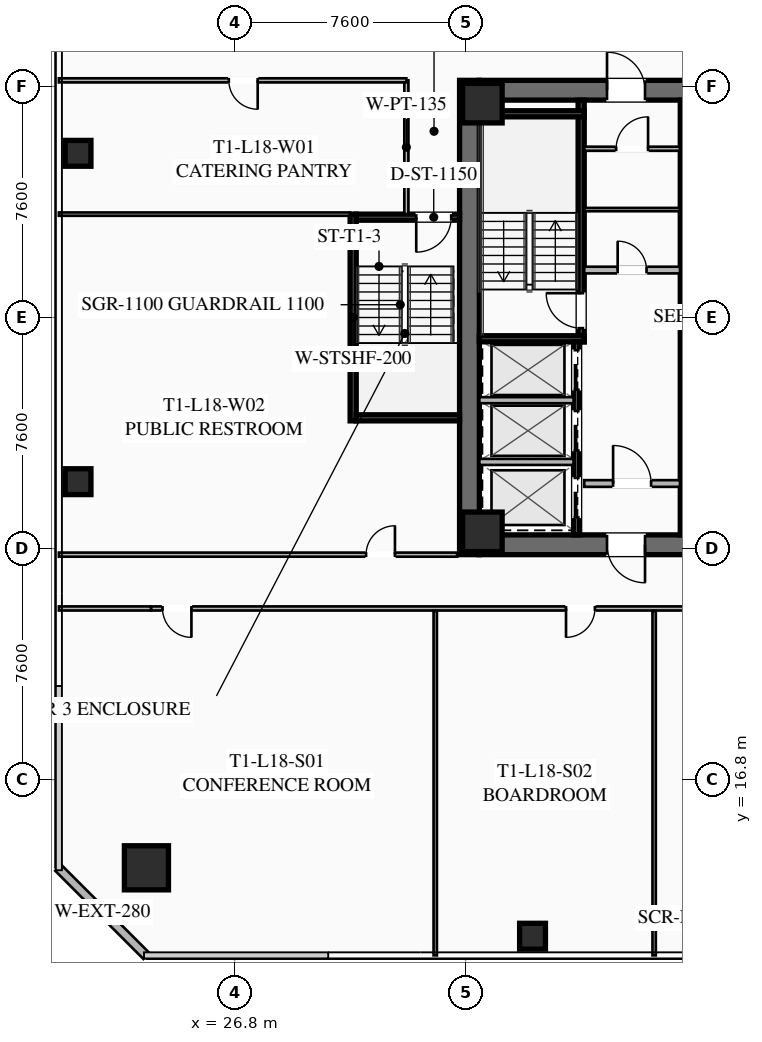
"""IFC4 building model, lengths in metres.
Left out: names, types, materials, properties, quantities, classifications, styles, units other than length and angle.
Written with IfcOpenShell. Run it as: python <this file> out.ifc"""

import sys

from ifc_helpers import new_model, si_unit, direction, frame, frame_2d, origin, origin_2d, place, context, subcontext, project, spatial, rectangle, hollow_rectangle, extrude, element, fill, save


model = new_model("IFC4")
c1 = context("Model", 3, precision=1e-05, world=origin(), true_north=direction((0.0, 1.0)))
c2 = subcontext(c1, "Body", "Model", "MODEL_VIEW")
j1 = project(units=[si_unit("LENGTHUNIT", "METRE"), si_unit("PLANEANGLEUNIT", "RADIAN")], contexts=[c1])
p1 = place(None, origin())
s1 = spatial("IfcSite", under=j1, at=p1, CompositionType="ELEMENT")
p2 = place(p1, origin())
s2 = spatial("IfcBuilding", under=s1, at=p2, CompositionType="ELEMENT")
p3 = place(p2, frame((0.0, 0.0, 70.75)))
s3 = spatial("IfcBuildingStorey", under=s2, at=p3, CompositionType="ELEMENT", Elevation=70.75)
p4 = place(p3, frame((34.525, 24.2, 0.0), z_axis=(0.0, 0.0, 1.0), x_axis=(0.0, 1.0, 0.0)))
e1 = element("IfcWall", 1, at=p4, inside=s3, PredefinedType="SHEAR", context=c2, shape_type="SweptSolid", body=[
    extrude(rectangle(XDim=15.6, YDim=0.65, at=frame_2d((7.8, 0.0))), origin(), (0.0, 0.0, 1.0), 3.55),
])
p5 = place(p3, frame((49.15, 24.525, 0.0), z_axis=(0.0, 0.0, 1.0), x_axis=(-1.0, 0.0, 0.0)))
e2 = element("IfcWall", 2, at=p5, inside=s3, PredefinedType="SHEAR", context=c2, shape_type="SweptSolid", body=[
    extrude(rectangle(XDim=14.3, YDim=0.65, at=frame_2d((7.15, 0.0))), origin(), (0.0, 0.0, 1.0), 3.55),
])
p6 = place(p5, frame((8.85, 0.0, 0.0)))
e3 = element("IfcOpeningElement", 3, at=p6, cuts=e2, PredefinedType="OPENING", context=c2, shape_type="SweptSolid", body=[
    extrude(rectangle(XDim=1.25, YDim=2.25, at=frame_2d((0.625, 1.125))), frame((0.0, 0.335, 0.0), z_axis=(0.0, -1.0, 0.0), x_axis=(1.0, 0.0, 0.0)), (0.0, 0.0, 1.0), 0.67),
])
p7 = place(p5, frame((3.8, 0.0, 0.0)))
e4 = element("IfcOpeningElement", 4, at=p7, cuts=e2, PredefinedType="OPENING", context=c2, shape_type="SweptSolid", body=[
    extrude(rectangle(XDim=1.25, YDim=2.25, at=frame_2d((0.625, 1.125))), frame((0.0, 0.335, 0.0), z_axis=(0.0, -1.0, 0.0), x_axis=(1.0, 0.0, 0.0)), (0.0, 0.0, 1.0), 0.67),
])
p8 = place(p3, frame((34.85, 39.475, 0.0), z_axis=(0.0, 0.0, 1.0), x_axis=(1.0, 0.0, 0.0)))
e5 = element("IfcWall", 5, at=p8, inside=s3, PredefinedType="SHEAR", context=c2, shape_type="SweptSolid", body=[
    extrude(rectangle(XDim=14.3, YDim=0.65, at=frame_2d((7.15, 0.0))), origin(), (0.0, 0.0, 1.0), 3.55),
])
p9 = place(p8, frame((4.2, 0.0, 0.0)))
e6 = element("IfcOpeningElement", 6, at=p9, cuts=e5, PredefinedType="OPENING", context=c2, shape_type="SweptSolid", body=[
    extrude(rectangle(XDim=1.25, YDim=2.25, at=frame_2d((0.625, 1.125))), frame((0.0, 0.335, 0.0), z_axis=(0.0, -1.0, 0.0), x_axis=(1.0, 0.0, 0.0)), (0.0, 0.0, 1.0), 0.67),
])
p10 = place(p8, frame((9.25, 0.0, 0.0)))
e7 = element("IfcOpeningElement", 7, at=p10, cuts=e5, PredefinedType="OPENING", context=c2, shape_type="SweptSolid", body=[
    extrude(rectangle(XDim=1.25, YDim=2.25, at=frame_2d((0.625, 1.125))), frame((0.0, 0.335, 0.0), z_axis=(0.0, -1.0, 0.0), x_axis=(1.0, 0.0, 0.0)), (0.0, 0.0, 1.0), 0.67),
])
for number, where, z_axis, x_axis in (
    (8, (34.95, 24.95, 0.0), (0.0, 0.0, 1.0), (1.0, 0.0, 0.0)),
    (9, (34.95, 39.05, 0.0), (0.0, 0.0, 1.0), (1.0, 0.0, 0.0)),
):
    element("IfcColumn", number, at=place(p3, frame(where, z_axis=z_axis, x_axis=x_axis)), inside=s3, PredefinedType="COLUMN", context=c2, shape_type="SweptSolid", body=[
        extrude(hollow_rectangle(XDim=1.3, YDim=1.3, WallThickness=0.05, at=origin_2d()), origin(), (0.0, 0.0, 1.0), 3.35),
    ])
p11 = place(p3, frame((23.9, 13.9, 0.0), z_axis=(0.0, 0.0, 1.0), x_axis=(1.0, 0.0, 0.0)))
e10 = element("IfcColumn", 10, at=p11, inside=s3, PredefinedType="COLUMN", context=c2, shape_type="SweptSolid", body=[
    extrude(hollow_rectangle(XDim=1.45, YDim=1.45, WallThickness=0.055, at=origin_2d()), origin(), (0.0, 0.0, 1.0), 3.35),
])
for number, where, z_axis, x_axis in (
    (11, (36.6, 11.65, 0.0), (0.0, 0.0, 1.0), (1.0, 0.0, 0.0)),
    (12, (21.65, 37.4, 0.0), (0.0, 0.0, 1.0), (1.0, 0.0, 0.0)),
    (13, (21.65, 26.6, 0.0), (0.0, 0.0, 1.0), (1.0, 0.0, 0.0)),
):
    element("IfcColumn", number, at=place(p3, frame(where, z_axis=z_axis, x_axis=x_axis)), inside=s3, PredefinedType="COLUMN", context=c2, shape_type="SweptSolid", body=[
        extrude(hollow_rectangle(XDim=0.85, YDim=0.85, WallThickness=0.035, at=origin_2d()), origin(), (0.0, 0.0, 1.0), 3.35),
    ])
p12 = place(p3, frame((23.9, 11.0, 0.0), z_axis=(0.0, 0.0, 1.0), x_axis=(-0.707106781187, 0.707106781187, 0.0)))
e14 = element("IfcWall", 14, at=p12, inside=s3, PredefinedType="SOLIDWALL", context=c2, shape_type="SweptSolid", body=[
    extrude(rectangle(XDim=4.101, YDim=0.28, at=frame_2d((2.051, 0.0))), origin(), (0.0, 0.0, 1.0), 3.35),
])
p13 = place(p3, frame((38.2, 31.2, 0.0), z_axis=(0.0, 0.0, 1.0), x_axis=(0.0, 1.0, 0.0)))
e15 = element("IfcWall", 15, at=p13, inside=s3, PredefinedType="SHEAR", context=c2, shape_type="SweptSolid", body=[
    extrude(rectangle(XDim=7.95, YDim=0.2, at=frame_2d((3.975, 0.0))), origin(), (0.0, 0.0, 1.0), 3.35),
])
p14 = place(p13, frame((0.45, 0.0, 0.0)))
e16 = element("IfcOpeningElement", 16, at=p14, cuts=e15, PredefinedType="OPENING", context=c2, shape_type="SweptSolid", body=[
    extrude(rectangle(XDim=1.15, YDim=2.2, at=frame_2d((0.575, 1.1))), frame((0.0, 0.11, 0.0), z_axis=(0.0, -1.0, 0.0), x_axis=(1.0, 0.0, 0.0)), (0.0, 0.0, 1.0), 0.22),
])
for number, where, z_axis, x_axis in (
    (17, (34.85, 31.3, 0.0), (0.0, 0.0, 1.0), (1.0, 0.0, 0.0)),
    (18, (34.85, 38.7, 0.0), (0.0, 0.0, 1.0), (1.0, 0.0, 0.0)),
):
    element("IfcWall", number, at=place(p3, frame(where, z_axis=z_axis, x_axis=x_axis)), inside=s3, PredefinedType="SHEAR", context=c2, shape_type="SweptSolid", body=[
        extrude(rectangle(XDim=3.45, YDim=0.2, at=frame_2d((1.725, 0.0))), origin(), (0.0, 0.0, 1.0), 3.35),
    ])
p15 = place(p3, frame((41.56, 24.85, 0.0), z_axis=(0.0, 0.0, 1.0), x_axis=(0.0, 1.0, 0.0)))
e19 = element("IfcWall", 19, at=p15, inside=s3, PredefinedType="SHEAR", context=c2, shape_type="SweptSolid", body=[
    extrude(rectangle(XDim=14.3, YDim=0.2, at=frame_2d((7.15, 0.0))), origin(), (0.0, 0.0, 1.0), 3.35),
])
p16 = place(p3, frame((38.3, 33.56, 0.0), z_axis=(0.0, 0.0, 1.0), x_axis=(1.0, 0.0, 0.0)))
e20 = element("IfcWall", 20, at=p16, inside=s3, PredefinedType="SOLIDWALL", context=c2, shape_type="SweptSolid", body=[
    extrude(rectangle(XDim=3.15, YDim=0.22, at=frame_2d((1.575, 0.0))), origin(), (0.0, 0.0, 1.0), 2.703),
])
p17 = place(p16, frame((1.1, 0.0, 0.0)))
e21 = element("IfcOpeningElement", 21, at=p17, cuts=e20, PredefinedType="OPENING", context=c2, shape_type="SweptSolid", body=[
    extrude(rectangle(XDim=0.95, YDim=2.05, at=frame_2d((0.475, 1.025))), frame((0.0, 0.12, 0.0), z_axis=(0.0, -1.0, 0.0), x_axis=(1.0, 0.0, 0.0)), (0.0, 0.0, 1.0), 0.24),
])
p18 = place(p3, frame((38.3, 26.54, 0.0), z_axis=(0.0, 0.0, 1.0), x_axis=(1.0, 0.0, 0.0)))
e22 = element("IfcWall", 22, at=p18, inside=s3, PredefinedType="SOLIDWALL", context=c2, shape_type="SweptSolid", body=[
    extrude(rectangle(XDim=3.15, YDim=0.22, at=frame_2d((1.575, 0.0))), origin(), (0.0, 0.0, 1.0), 2.703),
])
p19 = place(p18, frame((0.95, 0.0, 0.0)))
e23 = element("IfcOpeningElement", 23, at=p19, cuts=e22, PredefinedType="OPENING", context=c2, shape_type="SweptSolid", body=[
    extrude(rectangle(XDim=1.25, YDim=2.25, at=frame_2d((0.625, 1.125))), frame((0.0, 0.12, 0.0), z_axis=(0.0, -1.0, 0.0), x_axis=(1.0, 0.0, 0.0)), (0.0, 0.0, 1.0), 0.24),
])
p20 = place(p3, frame((38.05, 24.85, 0.0), z_axis=(0.0, 0.0, 1.0), x_axis=(0.0, 1.0, 0.0)))
e24 = element("IfcWall", 24, at=p20, inside=s3, PredefinedType="SHEAR", context=c2, shape_type="SweptSolid", body=[
    extrude(rectangle(XDim=6.35, YDim=0.2, at=frame_2d((3.175, 0.0))), origin(), (0.0, 0.0, 1.0), 3.35),
])
p21 = place(p20, frame((4.775, 0.0, 0.0)))
e25 = element("IfcOpeningElement", 25, at=p21, cuts=e24, PredefinedType="OPENING", context=c2, shape_type="SweptSolid", body=[
    extrude(rectangle(XDim=1.3, YDim=2.25, at=frame_2d((0.65, 1.125))), frame((0.0, 0.11, 0.0), z_axis=(0.0, -1.0, 0.0), x_axis=(1.0, 0.0, 0.0)), (0.0, 0.0, 1.0), 0.22),
])
p22 = place(p20, frame((2.775, 0.0, 0.0)))
e26 = element("IfcOpeningElement", 26, at=p22, cuts=e24, PredefinedType="OPENING", context=c2, shape_type="SweptSolid", body=[
    extrude(rectangle(XDim=1.3, YDim=2.25, at=frame_2d((0.65, 1.125))), frame((0.0, 0.11, 0.0), z_axis=(0.0, -1.0, 0.0), x_axis=(1.0, 0.0, 0.0)), (0.0, 0.0, 1.0), 0.22),
])
p23 = place(p20, frame((0.575, 0.0, 0.0)))
e27 = element("IfcOpeningElement", 27, at=p23, cuts=e24, PredefinedType="OPENING", context=c2, shape_type="SweptSolid", body=[
    extrude(rectangle(XDim=1.3, YDim=2.25, at=frame_2d((0.65, 1.125))), frame((0.0, 0.11, 0.0), z_axis=(0.0, -1.0, 0.0), x_axis=(1.0, 0.0, 0.0)), (0.0, 0.0, 1.0), 0.22),
])
for number, where, z_axis, x_axis in (
    (28, (34.85, 27.25, 0.0), (0.0, 0.0, 1.0), (1.0, 0.0, 0.0)),
    (29, (34.85, 29.28, 0.0), (0.0, 0.0, 1.0), (1.0, 0.0, 0.0)),
):
    element("IfcWall", number, at=place(p3, frame(where, z_axis=z_axis, x_axis=x_axis)), inside=s3, PredefinedType="SOLIDWALL", context=c2, shape_type="SweptSolid", body=[
        extrude(rectangle(XDim=3.1, YDim=0.2, at=frame_2d((1.55, 0.0))), origin(), (0.0, 0.0, 1.0), 3.35),
    ])
p24 = place(p3, frame((38.3, 37.55, 0.0), z_axis=(0.0, 0.0, 1.0), x_axis=(1.0, 0.0, 0.0)))
e30 = element("IfcWall", 30, at=p24, inside=s3, PredefinedType="PARTITIONING", context=c2, shape_type="SweptSolid", body=[
    extrude(rectangle(XDim=3.15, YDim=0.135, at=frame_2d((1.575, 0.0))), origin(), (0.0, 0.0, 1.0), 2.703),
])
p25 = place(p24, frame((1.05, 0.0, 0.0)))
e31 = element("IfcOpeningElement", 31, at=p25, cuts=e30, PredefinedType="OPENING", context=c2, shape_type="SweptSolid", body=[
    extrude(rectangle(XDim=1.05, YDim=2.2, at=frame_2d((0.525, 1.1))), frame((0.0, 0.077, 0.0), z_axis=(0.0, -1.0, 0.0), x_axis=(1.0, 0.0, 0.0)), (0.0, 0.0, 1.0), 0.155),
])
p26 = place(p3, frame((38.3, 35.55, 0.0), z_axis=(0.0, 0.0, 1.0), x_axis=(1.0, 0.0, 0.0)))
e32 = element("IfcWall", 32, at=p26, inside=s3, PredefinedType="PARTITIONING", context=c2, shape_type="SweptSolid", body=[
    extrude(rectangle(XDim=3.15, YDim=0.11, at=frame_2d((1.575, 0.0))), origin(), (0.0, 0.0, 1.0), 2.703),
])
p27 = place(p3, frame((30.7, 28.6, 0.0), z_axis=(0.0, 0.0, 1.0), x_axis=(0.0, 1.0, 0.0)))
e33 = element("IfcWall", 33, at=p27, inside=s3, PredefinedType="SHEAR", context=c2, shape_type="SweptSolid", body=[
    extrude(rectangle(XDim=6.8, YDim=0.2, at=frame_2d((3.4, 0.0))), origin(), (0.0, 0.0, 1.0), 3.35),
])
p28 = place(p3, frame((34.2, 35.3, 0.0), z_axis=(0.0, 0.0, 1.0), x_axis=(-1.0, 0.0, 0.0)))
e34 = element("IfcWall", 34, at=p28, inside=s3, PredefinedType="SHEAR", context=c2, shape_type="SweptSolid", body=[
    extrude(rectangle(XDim=3.4, YDim=0.2, at=frame_2d((1.7, 0.0))), origin(), (0.0, 0.0, 1.0), 3.35),
])
p29 = place(p28, frame((0.275, 0.0, 0.0)))
e35 = element("IfcOpeningElement", 35, at=p29, cuts=e34, PredefinedType="OPENING", context=c2, shape_type="SweptSolid", body=[
    extrude(rectangle(XDim=1.15, YDim=2.2, at=frame_2d((0.575, 1.1))), frame((0.0, 0.11, 0.0), z_axis=(0.0, -1.0, 0.0), x_axis=(1.0, 0.0, 0.0)), (0.0, 0.0, 1.0), 0.22),
])
p30 = place(p3, frame((30.8, 28.7, 0.0), z_axis=(0.0, 0.0, 1.0), x_axis=(1.0, 0.0, 0.0)))
e36 = element("IfcWall", 36, at=p30, inside=s3, PredefinedType="SHEAR", context=c2, shape_type="SweptSolid", body=[
    extrude(rectangle(XDim=3.4, YDim=0.2, at=frame_2d((1.7, 0.0))), origin(), (0.0, 0.0, 1.0), 3.35),
])
p31 = place(p3, frame((32.45, 35.4, 0.0), z_axis=(0.0, 0.0, 1.0), x_axis=(0.0, 1.0, 0.0)))
e37 = element("IfcWall", 37, at=p31, inside=s3, PredefinedType="PARTITIONING", context=c2, shape_type="SweptSolid", body=[
    extrude(rectangle(XDim=4.4, YDim=0.135, at=frame_2d((2.2, 0.0))), origin(), (0.0, 0.0, 1.0), 2.703),
])
p32 = place(p3, frame((51.35, 22.43, 0.0), z_axis=(0.0, 0.0, 1.0), x_axis=(-1.0, 0.0, 0.0)))
e38 = element("IfcWall", 38, at=p32, inside=s3, PredefinedType="PARTITIONING", context=c2, shape_type="SweptSolid", body=[
    extrude(rectangle(XDim=27.3, YDim=0.135, at=frame_2d((13.65, 0.0))), origin(), (0.0, 0.0, 1.0), 2.703),
])
p33 = place(p32, frame((25.97, 0.0, 0.0)))
e39 = element("IfcOpeningElement", 39, at=p33, cuts=e38, PredefinedType="OPENING", context=c2, shape_type="SweptSolid", body=[
    extrude(rectangle(XDim=0.95, YDim=2.05, at=frame_2d((0.475, 1.025))), frame((0.0, 0.077, 0.0), z_axis=(0.0, -1.0, 0.0), x_axis=(1.0, 0.0, 0.0)), (0.0, 0.0, 1.0), 0.155),
])
p34 = place(p32, frame((12.698, 0.0, 0.0)))
e40 = element("IfcOpeningElement", 40, at=p34, cuts=e38, PredefinedType="OPENING", context=c2, shape_type="SweptSolid", body=[
    extrude(rectangle(XDim=0.95, YDim=2.05, at=frame_2d((0.475, 1.025))), frame((0.0, 0.077, 0.0), z_axis=(0.0, -1.0, 0.0), x_axis=(1.0, 0.0, 0.0)), (0.0, 0.0, 1.0), 0.155),
])
p35 = place(p32, frame((8.639, 0.0, 0.0)))
e41 = element("IfcOpeningElement", 41, at=p35, cuts=e38, PredefinedType="OPENING", context=c2, shape_type="SweptSolid", body=[
    extrude(rectangle(XDim=0.95, YDim=2.05, at=frame_2d((0.475, 1.025))), frame((0.0, 0.077, 0.0), z_axis=(0.0, -1.0, 0.0), x_axis=(1.0, 0.0, 0.0)), (0.0, 0.0, 1.0), 0.155),
])
p36 = place(p32, frame((0.38, 0.0, 0.0)))
e42 = element("IfcOpeningElement", 42, at=p36, cuts=e38, PredefinedType="OPENING", context=c2, shape_type="SweptSolid", body=[
    extrude(rectangle(XDim=0.95, YDim=2.05, at=frame_2d((0.475, 1.025))), frame((0.0, 0.077, 0.0), z_axis=(0.0, -1.0, 0.0), x_axis=(1.0, 0.0, 0.0)), (0.0, 0.0, 1.0), 0.155),
])
p37 = place(p3, frame((21.02, 22.43, 0.0), z_axis=(0.0, 0.0, 1.0), x_axis=(1.0, 0.0, 0.0)))
e43 = element("IfcWall", 43, at=p37, inside=s3, PredefinedType="PARTITIONING", context=c2, shape_type="SweptSolid", body=[
    extrude(rectangle(XDim=3.03, YDim=0.135, at=frame_2d((1.515, 0.0))), origin(), (0.0, 0.0, 1.0), 2.703),
])
for number, where, z_axis, x_axis in (
    (44, (33.4, 11.02, 0.0), (0.0, 0.0, 1.0), (0.0, 1.0, 0.0)),
    (45, (40.6, 11.02, 0.0), (0.0, 0.0, 1.0), (0.0, 1.0, 0.0)),
):
    element("IfcWall", number, at=place(p3, frame(where, z_axis=z_axis, x_axis=x_axis)), inside=s3, PredefinedType="PARTITIONING", context=c2, shape_type="SweptSolid", body=[
        extrude(rectangle(XDim=11.33, YDim=0.11, at=frame_2d((5.665, 0.0))), origin(), (0.0, 0.0, 1.0), 2.703),
    ])
p38 = place(p3, frame((32.45, 39.8, 0.0), z_axis=(0.0, 0.0, 1.0), x_axis=(-1.0, 0.0, 0.0)))
e46 = element("IfcWall", 46, at=p38, inside=s3, PredefinedType="PARTITIONING", context=c2, shape_type="SweptSolid", body=[
    extrude(rectangle(XDim=11.43, YDim=0.135, at=frame_2d((5.715, 0.0))), origin(), (0.0, 0.0, 1.0), 2.703),
])
p39 = place(p38, frame((4.89, 0.0, 0.0)))
e47 = element("IfcOpeningElement", 47, at=p39, cuts=e46, PredefinedType="OPENING", context=c2, shape_type="SweptSolid", body=[
    extrude(rectangle(XDim=0.95, YDim=2.05, at=frame_2d((0.475, 1.025))), frame((0.0, 0.077, 0.0), z_axis=(0.0, -1.0, 0.0), x_axis=(1.0, 0.0, 0.0)), (0.0, 0.0, 1.0), 0.155),
])
p40 = place(p3, frame((21.02, 24.2, 0.0), z_axis=(0.0, 0.0, 1.0), x_axis=(1.0, 0.0, 0.0)))
e48 = element("IfcWall", 48, at=p40, inside=s3, PredefinedType="PARTITIONING", context=c2, shape_type="SweptSolid", body=[
    extrude(rectangle(XDim=13.1, YDim=0.135, at=frame_2d((6.55, 0.0))), origin(), (0.0, 0.0, 1.0), 2.703),
])
p41 = place(p40, frame((10.105, 0.0, 0.0)))
e49 = element("IfcOpeningElement", 49, at=p41, cuts=e48, PredefinedType="OPENING", context=c2, shape_type="SweptSolid", body=[
    extrude(rectangle(XDim=0.95, YDim=2.05, at=frame_2d((0.475, 1.025))), frame((0.0, 0.077, 0.0), z_axis=(0.0, -1.0, 0.0), x_axis=(1.0, 0.0, 0.0)), (0.0, 0.0, 1.0), 0.155),
])
p42 = place(p3, frame((30.6, 35.4, 0.0), z_axis=(0.0, 0.0, 1.0), x_axis=(-1.0, 0.0, 0.0)))
e50 = element("IfcWall", 50, at=p42, inside=s3, PredefinedType="PARTITIONING", context=c2, shape_type="SweptSolid", body=[
    extrude(rectangle(XDim=9.58, YDim=0.11, at=frame_2d((4.79, 0.0))), origin(), (0.0, 0.0, 1.0), 2.703),
])
p43 = place(p9, origin())
e51 = element("IfcDoor", 51, at=p43, inside=s3, OperationType="SINGLE_SWING_LEFT", PredefinedType="DOOR", context=c2, shape_type="SweptSolid", body=[
    extrude(rectangle(XDim=1.25, YDim=2.25, at=frame_2d((0.625, 1.125))), frame((0.0, 0.025, 0.0), z_axis=(0.0, -1.0, 0.0), x_axis=(1.0, 0.0, 0.0)), (0.0, 0.0, 1.0), 0.05),
])
fill(e6, e51)
p44 = place(p6, origin())
e52 = element("IfcDoor", 52, at=p44, inside=s3, OperationType="SINGLE_SWING_LEFT", PredefinedType="DOOR", context=c2, shape_type="SweptSolid", body=[
    extrude(rectangle(XDim=1.25, YDim=2.25, at=frame_2d((0.625, 1.125))), frame((0.0, 0.025, 0.0), z_axis=(0.0, -1.0, 0.0), x_axis=(1.0, 0.0, 0.0)), (0.0, 0.0, 1.0), 0.05),
])
fill(e3, e52)
p45 = place(p14, origin())
e53 = element("IfcDoor", 53, at=p45, inside=s3, OperationType="SINGLE_SWING_RIGHT", PredefinedType="DOOR", context=c2, shape_type="SweptSolid", body=[
    extrude(rectangle(XDim=1.15, YDim=2.2, at=frame_2d((0.575, 1.1))), frame((0.0, 0.025, 0.0), z_axis=(0.0, -1.0, 0.0), x_axis=(1.0, 0.0, 0.0)), (0.0, 0.0, 1.0), 0.05),
])
fill(e16, e53)
p46 = place(p19, origin())
e54 = element("IfcDoor", 54, at=p46, inside=s3, OperationType="SINGLE_SWING_LEFT", PredefinedType="DOOR", context=c2, shape_type="SweptSolid", body=[
    extrude(rectangle(XDim=1.25, YDim=2.25, at=frame_2d((0.625, 1.125))), frame((0.0, 0.025, 0.0), z_axis=(0.0, -1.0, 0.0), x_axis=(1.0, 0.0, 0.0)), (0.0, 0.0, 1.0), 0.05),
])
fill(e23, e54)
p47 = place(p25, origin())
e55 = element("IfcDoor", 55, at=p47, inside=s3, OperationType="SINGLE_SWING_RIGHT", PredefinedType="DOOR", context=c2, shape_type="SweptSolid", body=[
    extrude(rectangle(XDim=1.05, YDim=2.2, at=frame_2d((0.525, 1.1))), frame((0.0, 0.025, 0.0), z_axis=(0.0, -1.0, 0.0), x_axis=(1.0, 0.0, 0.0)), (0.0, 0.0, 1.0), 0.05),
])
fill(e31, e55)
p48 = place(p17, origin())
e56 = element("IfcDoor", 56, at=p48, inside=s3, OperationType="SINGLE_SWING_LEFT", PredefinedType="DOOR", context=c2, shape_type="SweptSolid", body=[
    extrude(rectangle(XDim=0.95, YDim=2.05, at=frame_2d((0.475, 1.025))), frame((0.0, 0.025, 0.0), z_axis=(0.0, -1.0, 0.0), x_axis=(1.0, 0.0, 0.0)), (0.0, 0.0, 1.0), 0.05),
])
fill(e21, e56)
p49 = place(p29, origin())
e57 = element("IfcDoor", 57, at=p49, inside=s3, OperationType="SINGLE_SWING_RIGHT", PredefinedType="DOOR", context=c2, shape_type="SweptSolid", body=[
    extrude(rectangle(XDim=1.15, YDim=2.2, at=frame_2d((0.575, 1.1))), frame((0.0, 0.025, 0.0), z_axis=(0.0, -1.0, 0.0), x_axis=(1.0, 0.0, 0.0)), (0.0, 0.0, 1.0), 0.05),
])
fill(e35, e57)
p50 = place(p33, origin())
e58 = element("IfcDoor", 58, at=p50, inside=s3, OperationType="SINGLE_SWING_LEFT", PredefinedType="DOOR", context=c2, shape_type="SweptSolid", body=[
    extrude(rectangle(XDim=0.95, YDim=2.05, at=frame_2d((0.475, 1.025))), frame((0.0, 0.025, 0.0), z_axis=(0.0, -1.0, 0.0), x_axis=(1.0, 0.0, 0.0)), (0.0, 0.0, 1.0), 0.05),
])
fill(e39, e58)
p51 = place(p34, origin())
e59 = element("IfcDoor", 59, at=p51, inside=s3, OperationType="SINGLE_SWING_RIGHT", PredefinedType="DOOR", context=c2, shape_type="SweptSolid", body=[
    extrude(rectangle(XDim=0.95, YDim=2.05, at=frame_2d((0.475, 1.025))), frame((0.0, 0.025, 0.0), z_axis=(0.0, -1.0, 0.0), x_axis=(1.0, 0.0, 0.0)), (0.0, 0.0, 1.0), 0.05),
])
fill(e40, e59)
p52 = place(p39, origin())
e60 = element("IfcDoor", 60, at=p52, inside=s3, OperationType="SINGLE_SWING_LEFT", PredefinedType="DOOR", context=c2, shape_type="SweptSolid", body=[
    extrude(rectangle(XDim=0.95, YDim=2.05, at=frame_2d((0.475, 1.025))), frame((0.0, 0.025, 0.0), z_axis=(0.0, -1.0, 0.0), x_axis=(1.0, 0.0, 0.0)), (0.0, 0.0, 1.0), 0.05),
])
fill(e47, e60)
p53 = place(p41, origin())
e61 = element("IfcDoor", 61, at=p53, inside=s3, OperationType="SINGLE_SWING_RIGHT", PredefinedType="DOOR", context=c2, shape_type="SweptSolid", body=[
    extrude(rectangle(XDim=0.95, YDim=2.05, at=frame_2d((0.475, 1.025))), frame((0.0, 0.025, 0.0), z_axis=(0.0, -1.0, 0.0), x_axis=(1.0, 0.0, 0.0)), (0.0, 0.0, 1.0), 0.05),
])
fill(e49, e61)
p54 = place(p21, origin())
e62 = element("IfcDoor", 62, at=p54, inside=s3, OperationType="SLIDING_TO_LEFT", PredefinedType="DOOR", context=c2, shape_type="SweptSolid", body=[
    extrude(rectangle(XDim=1.3, YDim=2.25, at=frame_2d((0.65, 1.125))), frame((0.0, 0.025, 0.0), z_axis=(0.0, -1.0, 0.0), x_axis=(1.0, 0.0, 0.0)), (0.0, 0.0, 1.0), 0.05),
])
fill(e25, e62)
p55 = place(p22, origin())
e63 = element("IfcDoor", 63, at=p55, inside=s3, OperationType="SLIDING_TO_LEFT", PredefinedType="DOOR", context=c2, shape_type="SweptSolid", body=[
    extrude(rectangle(XDim=1.3, YDim=2.25, at=frame_2d((0.65, 1.125))), frame((0.0, 0.025, 0.0), z_axis=(0.0, -1.0, 0.0), x_axis=(1.0, 0.0, 0.0)), (0.0, 0.0, 1.0), 0.05),
])
fill(e26, e63)
p56 = place(p23, origin())
e64 = element("IfcDoor", 64, at=p56, inside=s3, OperationType="SLIDING_TO_LEFT", PredefinedType="DOOR", context=c2, shape_type="SweptSolid", body=[
    extrude(rectangle(XDim=1.3, YDim=2.25, at=frame_2d((0.65, 1.125))), frame((0.0, 0.025, 0.0), z_axis=(0.0, -1.0, 0.0), x_axis=(1.0, 0.0, 0.0)), (0.0, 0.0, 1.0), 0.05),
])
fill(e27, e64)
save(model, sys.argv[1])
